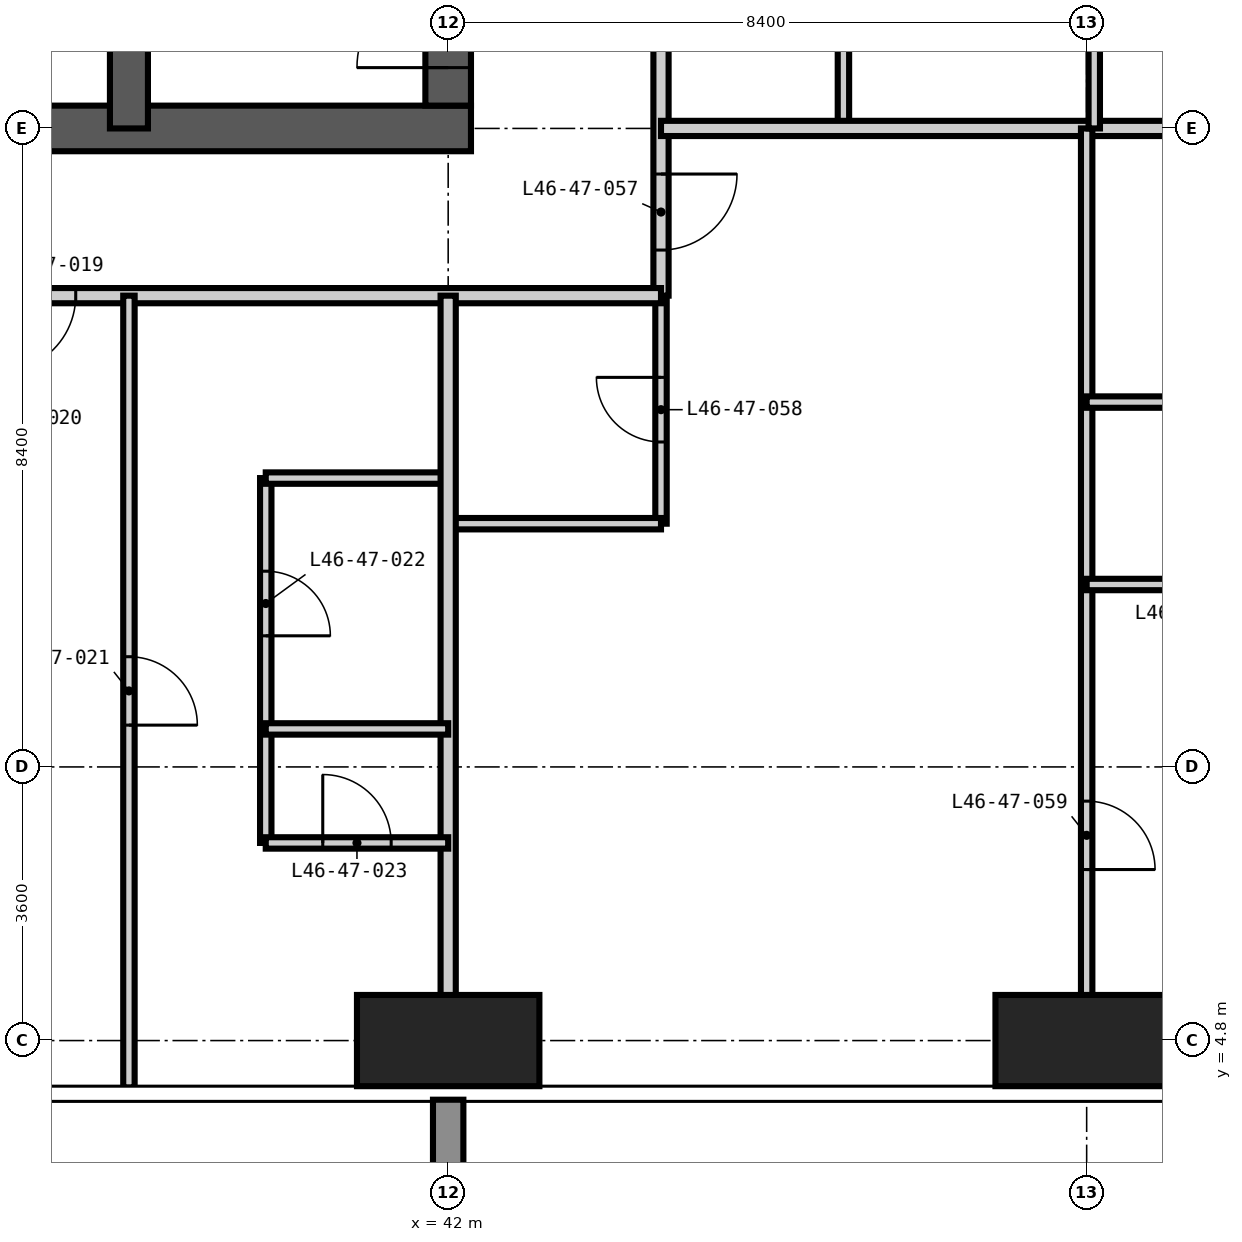
"""IFC4 building model, lengths in metres.
Left out: names, types, materials, properties, quantities, classifications, styles, units other than length and angle.
Written with IfcOpenShell. Run it as: python <this file> out.ifc"""

import sys

from ifc_helpers import new_model, si_unit, direction, frame, frame_2d, origin, origin_2d, place, context, subcontext, project, spatial, rectangle, extrude, element, fill, save


model = new_model("IFC4")
c1 = context("Model", 3, precision=1e-05, world=origin(), true_north=direction((0.0, 1.0)))
c2 = subcontext(c1, "Body", "Model", "MODEL_VIEW")
j1 = project(units=[si_unit("LENGTHUNIT", "METRE"), si_unit("PLANEANGLEUNIT", "RADIAN")], contexts=[c1])
p1 = place(None, origin())
s1 = spatial("IfcSite", under=j1, at=p1, CompositionType="ELEMENT")
p2 = place(p1, origin())
s2 = spatial("IfcBuilding", under=s1, at=p2, CompositionType="ELEMENT")
p3 = place(p2, frame((0.0, 0.0, 180.6)))
s3 = spatial("IfcBuildingStorey", under=s2, at=p3, CompositionType="ELEMENT", Elevation=180.6)
for number, where, z_axis, x_axis in (
    (1, (42.0, 4.8, -0.35), (0.0, 0.0, 1.0), (1.0, 0.0, 0.0)),
    (2, (50.4, 4.8, -0.35), (0.0, 0.0, 1.0), (1.0, 0.0, 0.0)),
):
    element("IfcColumn", number, at=place(p3, frame(where, z_axis=z_axis, x_axis=x_axis)), inside=s3, PredefinedType="COLUMN", context=c2, shape_type="SweptSolid", body=[
        extrude(rectangle(XDim=2.4, YDim=1.2, at=origin_2d()), origin(), (0.0, 0.0, 1.0), 3.6),
    ])
p4 = place(p3, frame((16.5, 16.8, -0.35), z_axis=(0.0, 0.0, 1.0), x_axis=(1.0, 0.0, 0.0)))
e3 = element("IfcWall", 3, at=p4, inside=s3, PredefinedType="SHEAR", context=c2, shape_type="SweptSolid", body=[
    extrude(rectangle(XDim=25.8, YDim=0.6, at=frame_2d((12.9, 0.0))), origin(), (0.0, 0.0, 1.0), 3.6),
])
p5 = place(p4, frame((12.4, 0.0, 0.35)))
e4 = element("IfcOpeningElement", 4, at=p5, cuts=e3, PredefinedType="OPENING", context=c2, shape_type="SweptSolid", body=[
    extrude(rectangle(XDim=1.0, YDim=2.1, at=frame_2d((0.5, 1.05))), frame((0.0, 0.31, 0.0), z_axis=(0.0, -1.0, 0.0), x_axis=(1.0, 0.0, 0.0)), (0.0, 0.0, 1.0), 0.62),
])
p6 = place(p4, frame((18.7, 0.0, 0.35)))
e5 = element("IfcOpeningElement", 5, at=p6, cuts=e3, PredefinedType="OPENING", context=c2, shape_type="SweptSolid", body=[
    extrude(rectangle(XDim=1.0, YDim=2.1, at=frame_2d((0.5, 1.05))), frame((0.0, 0.31, 0.0), z_axis=(0.0, -1.0, 0.0), x_axis=(1.0, 0.0, 0.0)), (0.0, 0.0, 1.0), 0.62),
])
p7 = place(p3, frame((42.0, 17.1, -0.35), z_axis=(0.0, 0.0, 1.0), x_axis=(0.0, 1.0, 0.0)))
e6 = element("IfcWall", 6, at=p7, inside=s3, PredefinedType="SHEAR", context=c2, shape_type="SweptSolid", body=[
    extrude(rectangle(XDim=24.6, YDim=0.6, at=frame_2d((12.3, 0.0))), origin(), (0.0, 0.0, 1.0), 3.6),
])
p8 = place(p7, frame((0.5, 0.0, 0.35)))
e7 = element("IfcOpeningElement", 7, at=p8, cuts=e6, PredefinedType="OPENING", context=c2, shape_type="SweptSolid", body=[
    extrude(rectangle(XDim=1.2, YDim=2.2, at=frame_2d((0.6, 1.1))), frame((0.0, 0.31, 0.0), z_axis=(0.0, -1.0, 0.0), x_axis=(1.0, 0.0, 0.0)), (0.0, 0.0, 1.0), 0.62),
])
p9 = place(p7, frame((11.8, 0.0, 0.35)))
e8 = element("IfcOpeningElement", 8, at=p9, cuts=e6, PredefinedType="OPENING", context=c2, shape_type="SweptSolid", body=[
    extrude(rectangle(XDim=1.0, YDim=2.1, at=frame_2d((0.5, 1.05))), frame((0.0, 0.31, 0.0), z_axis=(0.0, -1.0, 0.0), x_axis=(1.0, 0.0, 0.0)), (0.0, 0.0, 1.0), 0.62),
])
p10 = place(p7, frame((20.2, 0.0, 0.35)))
e9 = element("IfcOpeningElement", 9, at=p10, cuts=e6, PredefinedType="OPENING", context=c2, shape_type="SweptSolid", body=[
    extrude(rectangle(XDim=1.0, YDim=2.1, at=frame_2d((0.5, 1.05))), frame((0.0, 0.31, 0.0), z_axis=(0.0, -1.0, 0.0), x_axis=(1.0, 0.0, 0.0)), (0.0, 0.0, 1.0), 0.62),
])
p11 = place(p3, frame((37.8, 16.8, -0.35), z_axis=(0.0, 0.0, 1.0), x_axis=(0.0, 1.0, 0.0)))
e10 = element("IfcWall", 10, at=p11, inside=s3, PredefinedType="SHEAR", context=c2, shape_type="SweptSolid", body=[
    extrude(rectangle(XDim=11.2, YDim=0.5, at=frame_2d((5.6, 0.0))), origin(), (0.0, 0.0, 1.0), 3.6),
])
p12 = place(p3, frame((39.6, 8.9, 0.0), z_axis=(0.0, 0.0, 1.0), x_axis=(0.0, 1.0, 0.0)))
e11 = element("IfcWall", 11, at=p12, inside=s3, PredefinedType="PARTITIONING", context=c2, shape_type="SweptSolid", body=[
    extrude(rectangle(XDim=3.3, YDim=0.15, at=frame_2d((1.65, 0.0))), origin(), (0.0, 0.0, 1.0), 3.25),
])
p13 = place(p12, frame((1.225, 0.0, 0.0)))
e12 = element("IfcOpeningElement", 12, at=p13, cuts=e11, PredefinedType="OPENING", context=c2, shape_type="SweptSolid", body=[
    extrude(rectangle(XDim=0.85, YDim=2.1, at=frame_2d((0.425, 1.05))), frame((0.0, 0.085, 0.0), z_axis=(0.0, -1.0, 0.0), x_axis=(1.0, 0.0, 0.0)), (0.0, 0.0, 1.0), 0.17),
])
p14 = place(p3, frame((44.8, 11.6, 0.0), z_axis=(0.0, 0.0, 1.0), x_axis=(0.0, 1.0, 0.0)))
e13 = element("IfcWall", 13, at=p14, inside=s3, PredefinedType="PARTITIONING", context=c2, shape_type="SweptSolid", body=[
    extrude(rectangle(XDim=3.0, YDim=0.15, at=frame_2d((1.5, 0.0))), origin(), (0.0, 0.0, 1.0), 3.25),
])
p15 = place(p14, frame((1.075, 0.0, 0.0)))
e14 = element("IfcOpeningElement", 14, at=p15, cuts=e13, PredefinedType="OPENING", context=c2, shape_type="SweptSolid", body=[
    extrude(rectangle(XDim=0.85, YDim=2.1, at=frame_2d((0.425, 1.05))), frame((0.0, 0.085, 0.0), z_axis=(0.0, -1.0, 0.0), x_axis=(1.0, 0.0, 0.0)), (0.0, 0.0, 1.0), 0.17),
])
p16 = place(p3, frame((47.2, 16.8, 0.0), z_axis=(0.0, 0.0, 1.0), x_axis=(0.0, 1.0, 0.0)))
e15 = element("IfcWall", 15, at=p16, inside=s3, PredefinedType="PARTITIONING", context=c2, shape_type="SweptSolid", body=[
    extrude(rectangle(XDim=2.4, YDim=0.15, at=frame_2d((1.2, 0.0))), origin(), (0.0, 0.0, 1.0), 3.25),
])
p17 = place(p3, frame((42.0, 11.6, 0.0), z_axis=(0.0, 0.0, 1.0), x_axis=(1.0, 0.0, 0.0)))
e16 = element("IfcWall", 16, at=p17, inside=s3, PredefinedType="PARTITIONING", context=c2, shape_type="SweptSolid", body=[
    extrude(rectangle(XDim=2.8, YDim=0.15, at=frame_2d((1.4, 0.0))), origin(), (0.0, 0.0, 1.0), 3.25),
])
p18 = place(p3, frame((39.6, 12.2, 0.0), z_axis=(0.0, 0.0, 1.0), x_axis=(1.0, 0.0, 0.0)))
e17 = element("IfcWall", 17, at=p18, inside=s3, PredefinedType="PARTITIONING", context=c2, shape_type="SweptSolid", body=[
    extrude(rectangle(XDim=2.4, YDim=0.15, at=frame_2d((1.2, 0.0))), origin(), (0.0, 0.0, 1.0), 3.25),
])
p19 = place(p3, frame((44.8, 45.4, 0.0), z_axis=(0.0, 0.0, 1.0), x_axis=(0.0, -1.0, 0.0)))
e18 = element("IfcWall", 18, at=p19, inside=s3, PredefinedType="PARTITIONING", context=c2, shape_type="SweptSolid", body=[
    extrude(rectangle(XDim=30.8, YDim=0.2, at=frame_2d((15.4, 0.0))), origin(), (0.0, 0.0, 1.0), 3.25),
])
p20 = place(p19, frame((26.0, 0.0, 0.0)))
e19 = element("IfcOpeningElement", 19, at=p20, cuts=e18, PredefinedType="OPENING", context=c2, shape_type="SweptSolid", body=[
    extrude(rectangle(XDim=1.0, YDim=2.2, at=frame_2d((0.5, 1.1))), frame((0.0, 0.11, 0.0), z_axis=(0.0, -1.0, 0.0), x_axis=(1.0, 0.0, 0.0)), (0.0, 0.0, 1.0), 0.22),
])
p21 = place(p19, frame((21.8, 0.0, 0.0)))
e20 = element("IfcOpeningElement", 20, at=p21, cuts=e18, PredefinedType="OPENING", context=c2, shape_type="SweptSolid", body=[
    extrude(rectangle(XDim=1.0, YDim=2.2, at=frame_2d((0.5, 1.1))), frame((0.0, 0.11, 0.0), z_axis=(0.0, -1.0, 0.0), x_axis=(1.0, 0.0, 0.0)), (0.0, 0.0, 1.0), 0.22),
])
p22 = place(p19, frame((17.6, 0.0, 0.0)))
e21 = element("IfcOpeningElement", 21, at=p22, cuts=e18, PredefinedType="OPENING", context=c2, shape_type="SweptSolid", body=[
    extrude(rectangle(XDim=1.0, YDim=2.2, at=frame_2d((0.5, 1.1))), frame((0.0, 0.11, 0.0), z_axis=(0.0, -1.0, 0.0), x_axis=(1.0, 0.0, 0.0)), (0.0, 0.0, 1.0), 0.22),
])
p23 = place(p19, frame((13.4, 0.0, 0.0)))
e22 = element("IfcOpeningElement", 22, at=p23, cuts=e18, PredefinedType="OPENING", context=c2, shape_type="SweptSolid", body=[
    extrude(rectangle(XDim=1.0, YDim=2.2, at=frame_2d((0.5, 1.1))), frame((0.0, 0.11, 0.0), z_axis=(0.0, -1.0, 0.0), x_axis=(1.0, 0.0, 0.0)), (0.0, 0.0, 1.0), 0.22),
])
p24 = place(p19, frame((9.2, 0.0, 0.0)))
e23 = element("IfcOpeningElement", 23, at=p24, cuts=e18, PredefinedType="OPENING", context=c2, shape_type="SweptSolid", body=[
    extrude(rectangle(XDim=1.0, YDim=2.2, at=frame_2d((0.5, 1.1))), frame((0.0, 0.11, 0.0), z_axis=(0.0, -1.0, 0.0), x_axis=(1.0, 0.0, 0.0)), (0.0, 0.0, 1.0), 0.22),
])
p25 = place(p19, frame((5.0, 0.0, 0.0)))
e24 = element("IfcOpeningElement", 24, at=p25, cuts=e18, PredefinedType="OPENING", context=c2, shape_type="SweptSolid", body=[
    extrude(rectangle(XDim=1.0, YDim=2.2, at=frame_2d((0.5, 1.1))), frame((0.0, 0.11, 0.0), z_axis=(0.0, -1.0, 0.0), x_axis=(1.0, 0.0, 0.0)), (0.0, 0.0, 1.0), 0.22),
])
p26 = place(p19, frame((29.2, 0.0, 0.0)))
e25 = element("IfcOpeningElement", 25, at=p26, cuts=e18, PredefinedType="OPENING", context=c2, shape_type="SweptSolid", body=[
    extrude(rectangle(XDim=1.0, YDim=2.2, at=frame_2d((0.5, 1.1))), frame((0.0, 0.11, 0.0), z_axis=(0.0, -1.0, 0.0), x_axis=(1.0, 0.0, 0.0)), (0.0, 0.0, 1.0), 0.22),
])
p27 = place(p19, frame((1.2, 0.0, 0.0)))
e26 = element("IfcOpeningElement", 26, at=p27, cuts=e18, PredefinedType="OPENING", context=c2, shape_type="SweptSolid", body=[
    extrude(rectangle(XDim=1.0, YDim=2.2, at=frame_2d((0.5, 1.1))), frame((0.0, 0.11, 0.0), z_axis=(0.0, -1.0, 0.0), x_axis=(1.0, 0.0, 0.0)), (0.0, 0.0, 1.0), 0.22),
])
p28 = place(p3, frame((44.8, 14.6, 0.0), z_axis=(0.0, 0.0, 1.0), x_axis=(-1.0, 0.0, 0.0)))
e27 = element("IfcWall", 27, at=p28, inside=s3, PredefinedType="PARTITIONING", context=c2, shape_type="SweptSolid", body=[
    extrude(rectangle(XDim=30.2, YDim=0.2, at=frame_2d((15.1, 0.0))), origin(), (0.0, 0.0, 1.0), 3.25),
])
p29 = place(p28, frame((24.5, 0.0, 0.0)))
e28 = element("IfcOpeningElement", 28, at=p29, cuts=e27, PredefinedType="OPENING", context=c2, shape_type="SweptSolid", body=[
    extrude(rectangle(XDim=1.0, YDim=2.2, at=frame_2d((0.5, 1.1))), frame((0.0, 0.11, 0.0), z_axis=(0.0, -1.0, 0.0), x_axis=(1.0, 0.0, 0.0)), (0.0, 0.0, 1.0), 0.22),
])
p30 = place(p28, frame((13.7, 0.0, 0.0)))
e29 = element("IfcOpeningElement", 29, at=p30, cuts=e27, PredefinedType="OPENING", context=c2, shape_type="SweptSolid", body=[
    extrude(rectangle(XDim=1.0, YDim=2.2, at=frame_2d((0.5, 1.1))), frame((0.0, 0.11, 0.0), z_axis=(0.0, -1.0, 0.0), x_axis=(1.0, 0.0, 0.0)), (0.0, 0.0, 1.0), 0.22),
])
p31 = place(p28, frame((7.7, 0.0, 0.0)))
e30 = element("IfcOpeningElement", 30, at=p31, cuts=e27, PredefinedType="OPENING", context=c2, shape_type="SweptSolid", body=[
    extrude(rectangle(XDim=1.0, YDim=2.2, at=frame_2d((0.5, 1.1))), frame((0.0, 0.11, 0.0), z_axis=(0.0, -1.0, 0.0), x_axis=(1.0, 0.0, 0.0)), (0.0, 0.0, 1.0), 0.22),
])
p32 = place(p3, frame((42.0, 4.182, 0.0), z_axis=(0.0, 0.0, 1.0), x_axis=(0.0, 1.0, 0.0)))
e31 = element("IfcWall", 31, at=p32, inside=s3, PredefinedType="PARTITIONING", context=c2, shape_type="SweptSolid", body=[
    extrude(rectangle(XDim=10.418, YDim=0.2, at=frame_2d((5.209, 0.0))), origin(), (0.0, 0.0, 1.0), 3.25),
])
p33 = place(p3, frame((44.8, 16.8, 0.0), z_axis=(0.0, 0.0, 1.0), x_axis=(1.0, 0.0, 0.0)))
e32 = element("IfcWall", 32, at=p33, inside=s3, PredefinedType="PARTITIONING", context=c2, shape_type="SweptSolid", body=[
    extrude(rectangle(XDim=9.818, YDim=0.2, at=frame_2d((4.909, 0.0))), origin(), (0.0, 0.0, 1.0), 3.25),
])
p34 = place(p3, frame((37.8, 4.182, 0.0), z_axis=(0.0, 0.0, 1.0), x_axis=(0.0, 1.0, 0.0)))
e33 = element("IfcWall", 33, at=p34, inside=s3, PredefinedType="PARTITIONING", context=c2, shape_type="SweptSolid", body=[
    extrude(rectangle(XDim=10.418, YDim=0.15, at=frame_2d((5.209, 0.0))), origin(), (0.0, 0.0, 1.0), 3.25),
])
p35 = place(p34, frame((4.768, 0.0, 0.0)))
e34 = element("IfcOpeningElement", 34, at=p35, cuts=e33, PredefinedType="OPENING", context=c2, shape_type="SweptSolid", body=[
    extrude(rectangle(XDim=0.9, YDim=2.1, at=frame_2d((0.45, 1.05))), frame((0.0, 0.085, 0.0), z_axis=(0.0, -1.0, 0.0), x_axis=(1.0, 0.0, 0.0)), (0.0, 0.0, 1.0), 0.17),
])
p36 = place(p3, frame((39.6, 7.4, 0.0), z_axis=(0.0, 0.0, 1.0), x_axis=(0.0, 1.0, 0.0)))
e35 = element("IfcWall", 35, at=p36, inside=s3, PredefinedType="PARTITIONING", context=c2, shape_type="SweptSolid", body=[
    extrude(rectangle(XDim=1.5, YDim=0.15, at=frame_2d((0.75, 0.0))), origin(), (0.0, 0.0, 1.0), 3.25),
])
p37 = place(p3, frame((50.4, 4.182, 0.0), z_axis=(0.0, 0.0, 1.0), x_axis=(0.0, 1.0, 0.0)))
e36 = element("IfcWall", 36, at=p37, inside=s3, PredefinedType="PARTITIONING", context=c2, shape_type="SweptSolid", body=[
    extrude(rectangle(XDim=12.618, YDim=0.15, at=frame_2d((6.309, 0.0))), origin(), (0.0, 0.0, 1.0), 3.25),
])
p38 = place(p37, frame((2.868, 0.0, 0.0)))
e37 = element("IfcOpeningElement", 37, at=p38, cuts=e36, PredefinedType="OPENING", context=c2, shape_type="SweptSolid", body=[
    extrude(rectangle(XDim=0.9, YDim=2.1, at=frame_2d((0.45, 1.05))), frame((0.0, 0.085, 0.0), z_axis=(0.0, -1.0, 0.0), x_axis=(1.0, 0.0, 0.0)), (0.0, 0.0, 1.0), 0.17),
])
p39 = place(p3, frame((50.5, 16.8, 0.0), z_axis=(0.0, 0.0, 1.0), x_axis=(0.0, 1.0, 0.0)))
e38 = element("IfcWall", 38, at=p39, inside=s3, PredefinedType="PARTITIONING", context=c2, shape_type="SweptSolid", body=[
    extrude(rectangle(XDim=2.4, YDim=0.15, at=frame_2d((1.2, 0.0))), origin(), (0.0, 0.0, 1.0), 3.25),
])
p40 = place(p3, frame((39.6, 7.4, 0.0), z_axis=(0.0, 0.0, 1.0), x_axis=(1.0, 0.0, 0.0)))
e39 = element("IfcWall", 39, at=p40, inside=s3, PredefinedType="PARTITIONING", context=c2, shape_type="SweptSolid", body=[
    extrude(rectangle(XDim=2.4, YDim=0.15, at=frame_2d((1.2, 0.0))), origin(), (0.0, 0.0, 1.0), 3.25),
])
p41 = place(p40, frame((0.75, 0.0, 0.0)))
e40 = element("IfcOpeningElement", 40, at=p41, cuts=e39, PredefinedType="OPENING", context=c2, shape_type="SweptSolid", body=[
    extrude(rectangle(XDim=0.9, YDim=2.1, at=frame_2d((0.45, 1.05))), frame((0.0, 0.085, 0.0), z_axis=(0.0, -1.0, 0.0), x_axis=(1.0, 0.0, 0.0)), (0.0, 0.0, 1.0), 0.17),
])
p42 = place(p3, frame((39.6, 8.9, 0.0), z_axis=(0.0, 0.0, 1.0), x_axis=(1.0, 0.0, 0.0)))
e41 = element("IfcWall", 41, at=p42, inside=s3, PredefinedType="PARTITIONING", context=c2, shape_type="SweptSolid", body=[
    extrude(rectangle(XDim=2.4, YDim=0.15, at=frame_2d((1.2, 0.0))), origin(), (0.0, 0.0, 1.0), 3.25),
])
p43 = place(p3, frame((50.4, 10.8, 0.0), z_axis=(0.0, 0.0, 1.0), x_axis=(1.0, 0.0, 0.0)))
e42 = element("IfcWall", 42, at=p43, inside=s3, PredefinedType="PARTITIONING", context=c2, shape_type="SweptSolid", body=[
    extrude(rectangle(XDim=3.0, YDim=0.15, at=frame_2d((1.5, 0.0))), origin(), (0.0, 0.0, 1.0), 3.25),
])
p44 = place(p43, frame((1.05, 0.0, 0.0)))
e43 = element("IfcOpeningElement", 43, at=p44, cuts=e42, PredefinedType="OPENING", context=c2, shape_type="SweptSolid", body=[
    extrude(rectangle(XDim=0.9, YDim=2.1, at=frame_2d((0.45, 1.05))), frame((0.0, 0.085, 0.0), z_axis=(0.0, -1.0, 0.0), x_axis=(1.0, 0.0, 0.0)), (0.0, 0.0, 1.0), 0.17),
])
p45 = place(p3, frame((50.4, 13.2, 0.0), z_axis=(0.0, 0.0, 1.0), x_axis=(1.0, 0.0, 0.0)))
e44 = element("IfcWall", 44, at=p45, inside=s3, PredefinedType="PARTITIONING", context=c2, shape_type="SweptSolid", body=[
    extrude(rectangle(XDim=3.0, YDim=0.15, at=frame_2d((1.5, 0.0))), origin(), (0.0, 0.0, 1.0), 3.25),
])
p46 = place(p8, origin())
e45 = element("IfcDoor", 45, at=p46, inside=s3, OperationType="SINGLE_SWING_LEFT", PredefinedType="DOOR", context=c2, shape_type="SweptSolid", body=[
    extrude(rectangle(XDim=1.2, YDim=2.2, at=frame_2d((0.6, 1.1))), frame((0.0, 0.025, 0.0), z_axis=(0.0, -1.0, 0.0), x_axis=(1.0, 0.0, 0.0)), (0.0, 0.0, 1.0), 0.05),
])
fill(e7, e45)
p47 = place(p31, origin())
e46 = element("IfcDoor", 46, at=p47, inside=s3, OperationType="SINGLE_SWING_RIGHT", PredefinedType="DOOR", context=c2, shape_type="SweptSolid", body=[
    extrude(rectangle(XDim=1.0, YDim=2.2, at=frame_2d((0.5, 1.1))), frame((0.0, 0.025, 0.0), z_axis=(0.0, -1.0, 0.0), x_axis=(1.0, 0.0, 0.0)), (0.0, 0.0, 1.0), 0.05),
])
fill(e30, e46)
p48 = place(p35, frame((0.9, 0.0, 0.0), z_axis=(0.0, 0.0, 1.0), x_axis=(-1.0, 0.0, 0.0)))
e47 = element("IfcDoor", 47, at=p48, inside=s3, OperationType="SINGLE_SWING_RIGHT", PredefinedType="DOOR", context=c2, shape_type="SweptSolid", body=[
    extrude(rectangle(XDim=0.9, YDim=2.1, at=frame_2d((0.45, 1.05))), frame((0.0, 0.025, 0.0), z_axis=(0.0, -1.0, 0.0), x_axis=(1.0, 0.0, 0.0)), (0.0, 0.0, 1.0), 0.05),
])
fill(e34, e47)
p49 = place(p13, frame((0.85, 0.0, 0.0), z_axis=(0.0, 0.0, 1.0), x_axis=(-1.0, 0.0, 0.0)))
e48 = element("IfcDoor", 48, at=p49, inside=s3, OperationType="SINGLE_SWING_RIGHT", PredefinedType="DOOR", context=c2, shape_type="SweptSolid", body=[
    extrude(rectangle(XDim=0.85, YDim=2.1, at=frame_2d((0.425, 1.05))), frame((0.0, 0.025, 0.0), z_axis=(0.0, -1.0, 0.0), x_axis=(1.0, 0.0, 0.0)), (0.0, 0.0, 1.0), 0.05),
])
fill(e12, e48)
p50 = place(p41, origin())
e49 = element("IfcDoor", 49, at=p50, inside=s3, OperationType="SINGLE_SWING_LEFT", PredefinedType="DOOR", context=c2, shape_type="SweptSolid", body=[
    extrude(rectangle(XDim=0.9, YDim=2.1, at=frame_2d((0.45, 1.05))), frame((0.0, 0.025, 0.0), z_axis=(0.0, -1.0, 0.0), x_axis=(1.0, 0.0, 0.0)), (0.0, 0.0, 1.0), 0.05),
])
fill(e40, e49)
p51 = place(p26, origin())
e50 = element("IfcDoor", 50, at=p51, inside=s3, OperationType="SINGLE_SWING_LEFT", PredefinedType="DOOR", context=c2, shape_type="SweptSolid", body=[
    extrude(rectangle(XDim=1.0, YDim=2.2, at=frame_2d((0.5, 1.1))), frame((0.0, 0.025, 0.0), z_axis=(0.0, -1.0, 0.0), x_axis=(1.0, 0.0, 0.0)), (0.0, 0.0, 1.0), 0.05),
])
fill(e25, e50)
p52 = place(p15, origin())
e51 = element("IfcDoor", 51, at=p52, inside=s3, OperationType="SINGLE_SWING_RIGHT", PredefinedType="DOOR", context=c2, shape_type="SweptSolid", body=[
    extrude(rectangle(XDim=0.85, YDim=2.1, at=frame_2d((0.425, 1.05))), frame((0.0, 0.025, 0.0), z_axis=(0.0, -1.0, 0.0), x_axis=(1.0, 0.0, 0.0)), (0.0, 0.0, 1.0), 0.05),
])
fill(e14, e51)
p53 = place(p38, frame((0.9, 0.0, 0.0), z_axis=(0.0, 0.0, 1.0), x_axis=(-1.0, 0.0, 0.0)))
e52 = element("IfcDoor", 52, at=p53, inside=s3, OperationType="SINGLE_SWING_RIGHT", PredefinedType="DOOR", context=c2, shape_type="SweptSolid", body=[
    extrude(rectangle(XDim=0.9, YDim=2.1, at=frame_2d((0.45, 1.05))), frame((0.0, 0.025, 0.0), z_axis=(0.0, -1.0, 0.0), x_axis=(1.0, 0.0, 0.0)), (0.0, 0.0, 1.0), 0.05),
])
fill(e37, e52)
save(model, sys.argv[1])
